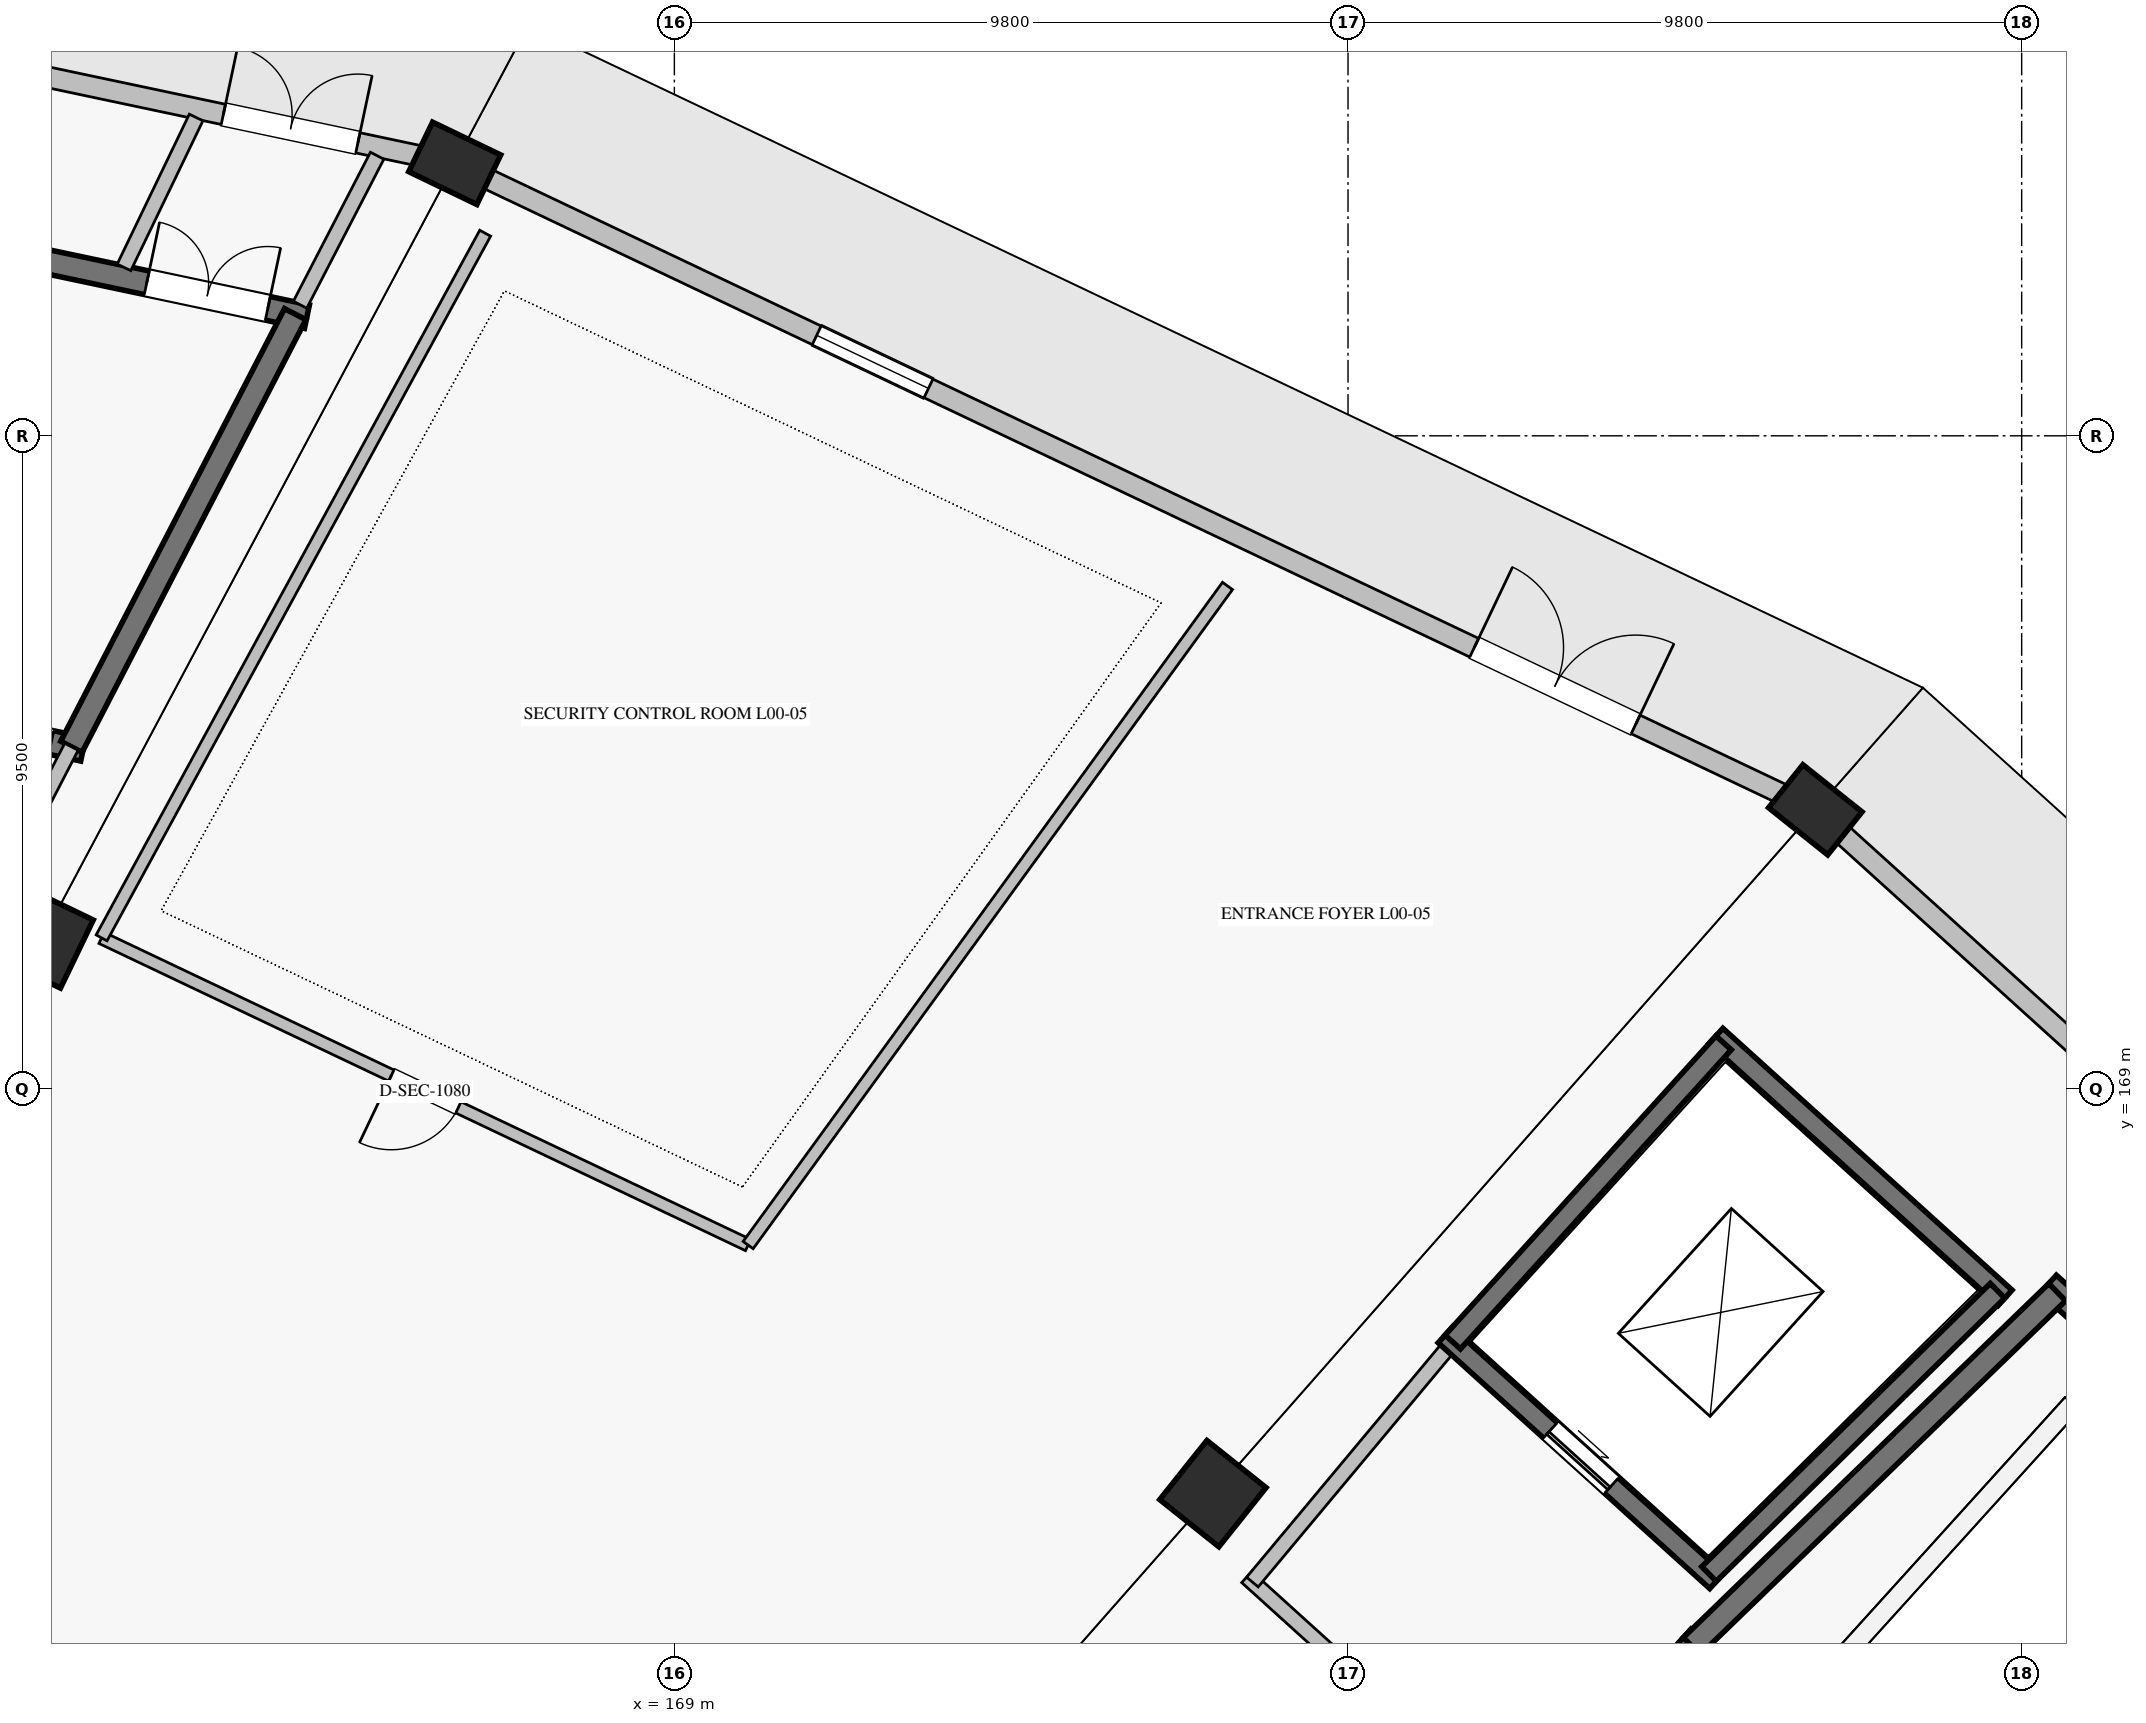
"""IFC4 building model, lengths in metres.
Left out: names, types, materials, properties, quantities, classifications, styles, units other than length and angle.
Written with IfcOpenShell. Run it as: python <this file> out.ifc"""

import sys

from ifc_helpers import new_model, si_unit, direction, frame, frame_2d, origin, origin_2d, place, context, subcontext, project, spatial, rectangle, extrude, element, fill, save


model = new_model("IFC4")
c1 = context("Model", 3, precision=1e-05, world=origin(), true_north=direction((0.0, 1.0)))
c2 = subcontext(c1, "Body", "Model", "MODEL_VIEW")
j1 = project(units=[si_unit("LENGTHUNIT", "METRE"), si_unit("PLANEANGLEUNIT", "RADIAN")], contexts=[c1])
p1 = place(None, origin())
s1 = spatial("IfcSite", under=j1, at=p1, CompositionType="ELEMENT")
p2 = place(p1, origin())
s2 = spatial("IfcBuilding", under=s1, at=p2, CompositionType="ELEMENT")
p3 = place(p2, origin())
s3 = spatial("IfcBuildingStorey", under=s2, at=p3, CompositionType="ELEMENT", Elevation=0.0)
for number, where, z_axis, x_axis in (
    (1, (176.834, 163.111, 0.0), (0.0, 0.0, 1.0), (0.623, 0.782, 0.0)),
    (2, (159.812, 171.199, 0.0), (0.0, 0.0, 1.0), (0.434, 0.901, 0.0)),
):
    element("IfcColumn", number, at=place(p3, frame(where, z_axis=z_axis, x_axis=x_axis)), inside=s3, PredefinedType="COLUMN", context=c2, shape_type="SweptSolid", body=[
        extrude(rectangle(XDim=1.1, YDim=1.1, at=origin_2d()), origin(), (0.0, 0.0, 1.0), 5.78),
    ])
for number, where, z_axis, x_axis in (
    (3, (185.598, 173.059, 0.0), (0.0, 0.0, 1.0), (0.623, 0.782, 0.0)),
    (4, (165.805, 182.464, 0.0), (0.0, 0.0, 1.0), (0.434, 0.901, 0.0)),
):
    element("IfcColumn", number, at=place(p3, frame(where, z_axis=z_axis, x_axis=x_axis)), inside=s3, PredefinedType="COLUMN", context=c2, shape_type="SweptSolid", body=[
        extrude(rectangle(XDim=0.8, YDim=1.1, at=origin_2d()), origin(), (0.0, 0.0, 1.0), 5.78),
    ])
p4 = place(p3, frame((201.206, 158.929, 0.0), z_axis=(0.0, 0.0, 1.0), x_axis=(-0.741354093053, 0.671114080253, 0.0)))
e5 = element("IfcWall", 5, at=p4, inside=s3, PredefinedType="SOLIDWALL", context=c2, shape_type="SweptSolid", body=[
    extrude(rectangle(XDim=20.664, YDim=0.3, at=frame_2d((10.332, 0.0))), origin(), (0.0, 0.0, 1.0), 4.8),
])
p5 = place(p4, frame((1.05, 0.0, 0.0)))
e6 = element("IfcOpeningElement", 6, at=p5, cuts=e5, PredefinedType="OPENING", context=c2, shape_type="SweptSolid", body=[
    extrude(rectangle(XDim=2.0, YDim=2.3, at=frame_2d((1.0, 1.15))), frame((0.0, 0.16, 0.0), z_axis=(0.0, -1.0, 0.0), x_axis=(1.0, 0.0, 0.0)), (0.0, 0.0, 1.0), 0.32),
])
p6 = place(p3, frame((185.246, 173.226, 0.0), z_axis=(0.0, 0.0, 1.0), x_axis=(-0.903214032263, 0.429190414528, 0.0)))
e7 = element("IfcWall", 7, at=p6, inside=s3, PredefinedType="SOLIDWALL", context=c2, shape_type="SweptSolid", body=[
    extrude(rectangle(XDim=21.134, YDim=0.3, at=frame_2d((10.567, 0.0))), origin(), (0.0, 0.0, 1.0), 4.8),
])
p7 = place(p6, frame((2.504, 0.0, 0.0)))
e8 = element("IfcOpeningElement", 8, at=p7, cuts=e7, PredefinedType="OPENING", context=c2, shape_type="SweptSolid", body=[
    extrude(rectangle(XDim=2.6, YDim=2.4, at=frame_2d((1.3, 1.2))), frame((0.0, 0.16, 0.0), z_axis=(0.0, -1.0, 0.0), x_axis=(1.0, 0.0, 0.0)), (0.0, 0.0, 1.0), 0.32),
])
p8 = place(p6, frame((13.894, 0.0, 1.1)))
e9 = element("IfcOpeningElement", 9, at=p8, cuts=e7, PredefinedType="OPENING", context=c2, shape_type="SweptSolid", body=[
    extrude(rectangle(XDim=1.8, YDim=1.5, at=frame_2d((0.9, 0.75))), frame((0.0, 0.16, 0.0), z_axis=(0.0, -1.0, 0.0), x_axis=(1.0, 0.0, 0.0)), (0.0, 0.0, 1.0), 0.32),
])
p9 = place(p3, frame((165.423, 182.545, 0.0), z_axis=(0.0, 0.0, 1.0), x_axis=(-0.978345100851, 0.206980346028, 0.0)))
e10 = element("IfcWall", 10, at=p9, inside=s3, PredefinedType="SOLIDWALL", context=c2, shape_type="SweptSolid", body=[
    extrude(rectangle(XDim=21.07, YDim=0.3, at=frame_2d((10.535, 0.0))), origin(), (0.0, 0.0, 1.0), 4.8),
])
p10 = place(p9, frame((1.05, 0.0, 0.0)))
e11 = element("IfcOpeningElement", 11, at=p10, cuts=e10, PredefinedType="OPENING", context=c2, shape_type="SweptSolid", body=[
    extrude(rectangle(XDim=2.0, YDim=2.3, at=frame_2d((1.0, 1.15))), frame((0.0, 0.16, 0.0), z_axis=(0.0, -1.0, 0.0), x_axis=(1.0, 0.0, 0.0)), (0.0, 0.0, 1.0), 0.32),
])
p11 = place(p3, frame((192.439, 153.072, 0.0), z_axis=(0.0, 0.0, 1.0), x_axis=(-0.741358227035, 0.671109513572, 0.0)))
e12 = element("IfcWall", 12, at=p11, inside=s3, PredefinedType="SHEAR", context=c2, shape_type="SweptSolid", body=[
    extrude(rectangle(XDim=11.827, YDim=0.35, at=frame_2d((5.913, 0.0))), origin(), (0.0, 0.0, 1.0), 5.5),
])
p12 = place(p11, frame((0.475, 0.0, 0.0)))
e13 = element("IfcOpeningElement", 13, at=p12, cuts=e12, PredefinedType="OPENING", context=c2, shape_type="SweptSolid", body=[
    extrude(rectangle(XDim=1.8, YDim=2.2, at=frame_2d((0.9, 1.1))), frame((0.0, 0.185, 0.0), z_axis=(0.0, -1.0, 0.0), x_axis=(1.0, 0.0, 0.0)), (0.0, 0.0, 1.0), 0.37),
])
p13 = place(p3, frame((198.499, 157.548, 0.0), z_axis=(0.0, 0.0, 1.0), x_axis=(-0.741351373721, 0.671117084183, 0.0)))
e14 = element("IfcWall", 14, at=p13, inside=s3, PredefinedType="SHEAR", context=c2, shape_type="SweptSolid", body=[
    extrude(rectangle(XDim=12.83, YDim=0.35, at=frame_2d((6.415, 0.0))), origin(), (0.0, 0.0, 1.0), 5.5),
])
p14 = place(p13, frame((0.602, 0.0, 0.0)))
e15 = element("IfcOpeningElement", 15, at=p14, cuts=e14, PredefinedType="OPENING", context=c2, shape_type="SweptSolid", body=[
    extrude(rectangle(XDim=1.8, YDim=2.2, at=frame_2d((0.9, 1.1))), frame((0.0, 0.185, 0.0), z_axis=(0.0, -1.0, 0.0), x_axis=(1.0, 0.0, 0.0)), (0.0, 0.0, 1.0), 0.37),
])
p15 = place(p3, frame((183.801, 160.892, 0.0), z_axis=(0.0, 0.0, 1.0), x_axis=(0.718297398554, 0.69573619083, 0.0)))
e16 = element("IfcWall", 16, at=p15, inside=s3, PredefinedType="SHEAR", context=c2, shape_type="SweptSolid", body=[
    extrude(rectangle(XDim=7.402, YDim=0.35, at=frame_2d((3.701, 0.0))), origin(), (0.0, 0.0, 1.0), 5.5),
])
p16 = place(p3, frame((184.163, 161.841, 0.0), z_axis=(0.0, 0.0, 1.0), x_axis=(-0.741350155641, 0.671118429736, 0.0)))
e17 = element("IfcWall", 17, at=p16, inside=s3, PredefinedType="SHEAR", context=c2, shape_type="SweptSolid", body=[
    extrude(rectangle(XDim=5.329, YDim=0.3, at=frame_2d((2.665, 0.0))), origin(), (0.0, 0.0, 1.0), 5.5),
])
p17 = place(p16, frame((2.065, 0.0, 0.0)))
e18 = element("IfcOpeningElement", 18, at=p17, cuts=e17, PredefinedType="OPENING", context=c2, shape_type="SweptSolid", body=[
    extrude(rectangle(XDim=1.2, YDim=2.2, at=frame_2d((0.6, 1.1))), frame((0.0, 0.16, 0.0), z_axis=(0.0, -1.0, 0.0), x_axis=(1.0, 0.0, 0.0)), (0.0, 0.0, 1.0), 0.32),
])
p18 = place(p3, frame((188.36, 165.961, 0.0), z_axis=(0.0, 0.0, 1.0), x_axis=(-0.74134208775, 0.671127341815, 0.0)))
e19 = element("IfcWall", 19, at=p18, inside=s3, PredefinedType="SHEAR", context=c2, shape_type="SweptSolid", body=[
    extrude(rectangle(XDim=5.675, YDim=0.3, at=frame_2d((2.837, 0.0))), origin(), (0.0, 0.0, 1.0), 5.5),
])
p19 = place(p3, frame((184.052, 161.941, 0.0), z_axis=(0.0, 0.0, 1.0), x_axis=(0.713553028001, 0.700601224828, 0.0)))
e20 = element("IfcWall", 20, at=p19, inside=s3, PredefinedType="SHEAR", context=c2, shape_type="SweptSolid", body=[
    extrude(rectangle(XDim=5.881, YDim=0.3, at=frame_2d((2.94, 0.0))), origin(), (0.0, 0.0, 1.0), 5.5),
])
p20 = place(p3, frame((180.324, 165.316, 0.0), z_axis=(0.0, 0.0, 1.0), x_axis=(0.67115829282, 0.741314067031, 0.0)))
e21 = element("IfcWall", 21, at=p20, inside=s3, PredefinedType="SHEAR", context=c2, shape_type="SweptSolid", body=[
    extrude(rectangle(XDim=5.871, YDim=0.3, at=frame_2d((2.935, 0.0))), origin(), (0.0, 0.0, 1.0), 5.5),
])
p21 = place(p3, frame((189.166, 151.181, 0.0), z_axis=(0.0, 0.0, 1.0), x_axis=(-0.741351035574, 0.671117457717, 0.0)))
e22 = element("IfcWall", 22, at=p21, inside=s3, PredefinedType="SOLIDWALL", context=c2, shape_type="SweptSolid", body=[
    extrude(rectangle(XDim=15.969, YDim=0.22, at=frame_2d((7.985, 0.0))), origin(), (0.0, 0.0, 1.0), 5.5),
])
p22 = place(p21, frame((6.447, 0.0, 0.0)))
e23 = element("IfcOpeningElement", 23, at=p22, cuts=e22, PredefinedType="OPENING", context=c2, shape_type="SweptSolid", body=[
    extrude(rectangle(XDim=1.5, YDim=2.2, at=frame_2d((0.75, 1.1))), frame((0.0, 0.12, 0.0), z_axis=(0.0, -1.0, 0.0), x_axis=(1.0, 0.0, 0.0)), (0.0, 0.0, 1.0), 0.24),
])
p23 = place(p3, frame((177.409, 161.824, 0.0), z_axis=(0.0, 0.0, 1.0), x_axis=(0.640759627034, 0.767741558315, 0.0)))
e24 = element("IfcWall", 24, at=p23, inside=s3, PredefinedType="SOLIDWALL", context=c2, shape_type="SweptSolid", body=[
    extrude(rectangle(XDim=4.549, YDim=0.22, at=frame_2d((2.274, 0.0))), origin(), (0.0, 0.0, 1.0), 5.5),
])
p24 = place(p3, frame((160.4, 173.94, 0.0), z_axis=(0.0, 0.0, 1.0), x_axis=(-0.978345203961, 0.206979858648, 0.0)))
e25 = element("IfcWall", 25, at=p24, inside=s3, PredefinedType="SHEAR", context=c2, shape_type="SweptSolid", body=[
    extrude(rectangle(XDim=12.044, YDim=0.35, at=frame_2d((6.022, 0.0))), origin(), (0.0, 0.0, 1.0), 5.5),
])
p25 = place(p24, frame((0.475, 0.0, 0.0)))
e26 = element("IfcOpeningElement", 26, at=p25, cuts=e25, PredefinedType="OPENING", context=c2, shape_type="SweptSolid", body=[
    extrude(rectangle(XDim=1.8, YDim=2.2, at=frame_2d((0.9, 1.1))), frame((0.0, 0.185, 0.0), z_axis=(0.0, -1.0, 0.0), x_axis=(1.0, 0.0, 0.0)), (0.0, 0.0, 1.0), 0.37),
])
p26 = place(p3, frame((163.655, 180.233, 0.0), z_axis=(0.0, 0.0, 1.0), x_axis=(-0.978345119536, 0.206980257705, 0.0)))
e27 = element("IfcWall", 27, at=p26, inside=s3, PredefinedType="SHEAR", context=c2, shape_type="SweptSolid", body=[
    extrude(rectangle(XDim=13.067, YDim=0.35, at=frame_2d((6.533, 0.0))), origin(), (0.0, 0.0, 1.0), 5.5),
])
p27 = place(p26, frame((0.582, 0.0, 0.0)))
e28 = element("IfcOpeningElement", 28, at=p27, cuts=e27, PredefinedType="OPENING", context=c2, shape_type="SweptSolid", body=[
    extrude(rectangle(XDim=1.8, YDim=2.2, at=frame_2d((0.9, 1.1))), frame((0.0, 0.185, 0.0), z_axis=(0.0, -1.0, 0.0), x_axis=(1.0, 0.0, 0.0)), (0.0, 0.0, 1.0), 0.37),
])
p28 = place(p3, frame((163.555, 180.407, 0.0), z_axis=(0.0, 0.0, 1.0), x_axis=(0.459376652804, 0.888241572354, 0.0)))
e29 = element("IfcWall", 29, at=p28, inside=s3, PredefinedType="SOLIDWALL", context=c2, shape_type="SweptSolid", body=[
    extrude(rectangle(XDim=2.44, YDim=0.22, at=frame_2d((1.22, 0.0))), origin(), (0.0, 0.0, 1.0), 5.5),
])
p29 = place(p3, frame((160.993, 180.95, 0.0), z_axis=(0.0, 0.0, 1.0), x_axis=(0.433685188572, 0.901064457857, 0.0)))
e30 = element("IfcWall", 30, at=p29, inside=s3, PredefinedType="SOLIDWALL", context=c2, shape_type="SweptSolid", body=[
    extrude(rectangle(XDim=2.42, YDim=0.22, at=frame_2d((1.21, 0.0))), origin(), (0.0, 0.0, 1.0), 5.5),
])
p30 = place(p3, frame((160.229, 173.976, 0.0), z_axis=(0.0, 0.0, 1.0), x_axis=(0.459409796564, 0.888224430435, 0.0)))
e31 = element("IfcWall", 31, at=p30, inside=s3, PredefinedType="SHEAR", context=c2, shape_type="SweptSolid", body=[
    extrude(rectangle(XDim=7.086, YDim=0.35, at=frame_2d((3.543, 0.0))), origin(), (0.0, 0.0, 1.0), 5.5),
])
p31 = place(p3, frame((158.976, 171.555, 0.0), z_axis=(0.0, 0.0, 1.0), x_axis=(0.459461910618, 0.888197473928, 0.0)))
e32 = element("IfcWall", 32, at=p31, inside=s3, PredefinedType="SOLIDWALL", context=c2, shape_type="SweptSolid", body=[
    extrude(rectangle(XDim=2.725, YDim=0.22, at=frame_2d((1.363, 0.0))), origin(), (0.0, 0.0, 1.0), 5.5),
])
p32 = place(p3, frame((170.073, 166.727, 0.0), z_axis=(0.0, 0.0, 1.0), x_axis=(-0.903212529205, 0.42919357764, 0.0)))
e33 = element("IfcWall", 33, at=p32, inside=s3, PredefinedType="PARTITIONING", context=c2, shape_type="SweptSolid", body=[
    extrude(rectangle(XDim=10.414, YDim=0.18, at=frame_2d((5.207, 0.0))), origin(), (0.0, 0.0, 1.0), 4.82),
])
p33 = place(p32, frame((4.667, 0.0, 0.0)))
e34 = element("IfcOpeningElement", 34, at=p33, cuts=e33, PredefinedType="OPENING", context=c2, shape_type="SweptSolid", body=[
    extrude(rectangle(XDim=1.08, YDim=2.15, at=frame_2d((0.54, 1.075))), frame((0.0, 0.1, 0.0), z_axis=(0.0, -1.0, 0.0), x_axis=(1.0, 0.0, 0.0)), (0.0, 0.0, 1.0), 0.2),
])
p34 = place(p3, frame((170.073, 166.727, 0.0), z_axis=(0.0, 0.0, 1.0), x_axis=(0.588160679051, 0.808744097733, 0.0)))
e35 = element("IfcWall", 35, at=p34, inside=s3, PredefinedType="PARTITIONING", context=c2, shape_type="SweptSolid", body=[
    extrude(rectangle(XDim=11.857, YDim=0.18, at=frame_2d((5.929, 0.0))), origin(), (0.0, 0.0, 1.0), 4.82),
])
p35 = place(p3, frame((160.667, 171.196, 0.0), z_axis=(0.0, 0.0, 1.0), x_axis=(0.478125060974, 0.878291765912, 0.0)))
e36 = element("IfcWall", 36, at=p35, inside=s3, PredefinedType="PARTITIONING", context=c2, shape_type="SweptSolid", body=[
    extrude(rectangle(XDim=11.672, YDim=0.18, at=frame_2d((5.836, 0.0))), origin(), (0.0, 0.0, 1.0), 4.82),
])
p36 = place(p7, frame((2.6, 0.0, 0.0), z_axis=(0.0, 0.0, 1.0), x_axis=(-1.0, 0.0, 0.0)))
e37 = element("IfcDoor", 37, at=p36, inside=s3, OperationType="DOUBLE_DOOR_SINGLE_SWING", PredefinedType="DOOR", context=c2, shape_type="SweptSolid", body=[
    extrude(rectangle(XDim=2.6, YDim=2.4, at=frame_2d((1.3, 1.2))), frame((0.0, 0.025, 0.0), z_axis=(0.0, -1.0, 0.0), x_axis=(1.0, 0.0, 0.0)), (0.0, 0.0, 1.0), 0.05),
])
fill(e8, e37)
p37 = place(p8, origin())
e38 = element("IfcWindow", 38, at=p37, inside=s3, PartitioningType="SINGLE_PANEL", PredefinedType="WINDOW", context=c2, shape_type="SweptSolid", body=[
    extrude(rectangle(XDim=1.8, YDim=1.5, at=frame_2d((0.9, 0.75))), frame((0.0, 0.03, 0.0), z_axis=(0.0, -1.0, 0.0), x_axis=(1.0, 0.0, 0.0)), (0.0, 0.0, 1.0), 0.06),
])
fill(e9, e38)
p38 = place(p10, frame((2.0, 0.0, 0.0), z_axis=(0.0, 0.0, 1.0), x_axis=(-1.0, 0.0, 0.0)))
e39 = element("IfcDoor", 39, at=p38, inside=s3, OperationType="DOUBLE_DOOR_SINGLE_SWING", PredefinedType="DOOR", context=c2, shape_type="SweptSolid", body=[
    extrude(rectangle(XDim=2.0, YDim=2.3, at=frame_2d((1.0, 1.15))), frame((0.0, 0.025, 0.0), z_axis=(0.0, -1.0, 0.0), x_axis=(1.0, 0.0, 0.0)), (0.0, 0.0, 1.0), 0.05),
])
fill(e11, e39)
p39 = place(p17, origin())
e40 = element("IfcDoor", 40, at=p39, inside=s3, OperationType="SLIDING_TO_LEFT", PredefinedType="DOOR", context=c2, shape_type="SweptSolid", body=[
    extrude(rectangle(XDim=1.2, YDim=2.2, at=frame_2d((0.6, 1.1))), frame((0.0, 0.025, 0.0), z_axis=(0.0, -1.0, 0.0), x_axis=(1.0, 0.0, 0.0)), (0.0, 0.0, 1.0), 0.05),
])
fill(e18, e40)
p40 = place(p27, frame((1.8, 0.0, 0.0), z_axis=(0.0, 0.0, 1.0), x_axis=(-1.0, 0.0, 0.0)))
e41 = element("IfcDoor", 41, at=p40, inside=s3, OperationType="DOUBLE_DOOR_SINGLE_SWING", PredefinedType="DOOR", context=c2, shape_type="SweptSolid", body=[
    extrude(rectangle(XDim=1.8, YDim=2.2, at=frame_2d((0.9, 1.1))), frame((0.0, 0.025, 0.0), z_axis=(0.0, -1.0, 0.0), x_axis=(1.0, 0.0, 0.0)), (0.0, 0.0, 1.0), 0.05),
])
fill(e28, e41)
p41 = place(p33, origin())
e42 = element("IfcDoor", 42, at=p41, inside=s3, OperationType="SINGLE_SWING_RIGHT", PredefinedType="DOOR", context=c2, shape_type="SweptSolid", body=[
    extrude(rectangle(XDim=1.08, YDim=2.15, at=frame_2d((0.54, 1.075))), frame((0.0, 0.025, 0.0), z_axis=(0.0, -1.0, 0.0), x_axis=(1.0, 0.0, 0.0)), (0.0, 0.0, 1.0), 0.05),
])
fill(e34, e42)
save(model, sys.argv[1])
